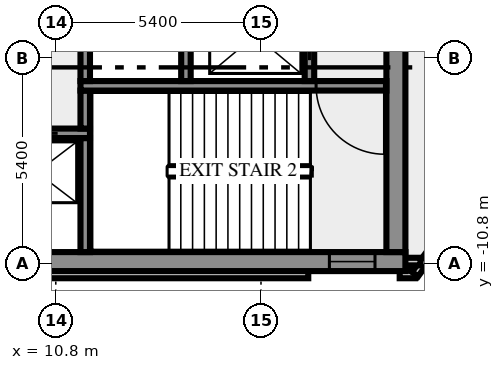
"""IFC4 building model, lengths in metres.
Left out: names, types, materials, properties, quantities, classifications, styles, units other than length and angle.
Written with IfcOpenShell. Run it as: python <this file> out.ifc"""

import sys

from ifc_helpers import new_model, si_unit, direction, frame, frame_2d, origin, place, context, subcontext, project, spatial, rectangle, extrude, element, fill, save


model = new_model("IFC4")
c1 = context("Model", 3, precision=1e-05, world=origin(), true_north=direction((0.0, 1.0)))
c2 = subcontext(c1, "Body", "Model", "MODEL_VIEW")
j1 = project(units=[si_unit("LENGTHUNIT", "METRE"), si_unit("PLANEANGLEUNIT", "RADIAN")], contexts=[c1])
p1 = place(None, origin())
s1 = spatial("IfcSite", under=j1, at=p1, CompositionType="ELEMENT")
p2 = place(p1, origin())
s2 = spatial("IfcBuilding", under=s1, at=p2, CompositionType="ELEMENT")
p3 = place(p2, frame((0.0, 0.0, 148.0)))
s3 = spatial("IfcBuildingStorey", under=s2, at=p3, CompositionType="ELEMENT", Elevation=148.0)
p4 = place(p3, frame((-17.444, -11.088, 0.0), z_axis=(0.0, 0.0, 1.0), x_axis=(1.0, 0.0, 0.0)))
e1 = element("IfcWall", 1, at=p4, inside=s3, PredefinedType="SOLIDWALL", context=c2, shape_type="SweptSolid", body=[
    extrude(rectangle(XDim=34.888, YDim=0.2, at=frame_2d((17.444, 0.0))), origin(), (0.0, 0.0, 1.0), 3.65),
])
p5 = place(p3, frame((19.85, -11.088, 0.0), z_axis=(0.0, 0.0, 1.0), x_axis=(1.0, 0.0, 0.0)))
e2 = element("IfcWall", 2, at=p5, inside=s3, PredefinedType="SOLIDWALL", context=c2, shape_type="SweptSolid", body=[
    extrude(rectangle(XDim=0.406, YDim=0.2, at=frame_2d((0.203, 0.0))), origin(), (0.0, 0.0, 1.0), 3.65),
])
p6 = place(p3, frame((20.253, -11.083, 0.0), z_axis=(0.0, 0.0, 1.0), x_axis=(0.587766567315, 0.809030569476, 0.0)))
e3 = element("IfcWall", 3, at=p6, inside=s3, PredefinedType="SOLIDWALL", context=c2, shape_type="SweptSolid", body=[
    extrude(rectangle(XDim=2.688, YDim=0.2, at=frame_2d((1.344, 0.0))), origin(), (0.0, 0.0, 1.0), 3.65),
])
p7 = place(p3, frame((19.98, -10.75, 0.0), z_axis=(0.0, 0.0, 1.0), x_axis=(1.0, 0.0, 0.0)))
e4 = element("IfcWall", 4, at=p7, inside=s3, PredefinedType="SOLIDWALL", context=c2, shape_type="SweptSolid", body=[
    extrude(rectangle(XDim=0.417, YDim=0.2, at=frame_2d((0.208, 0.0))), origin(), (0.0, 0.0, 1.0), 3.65),
])
p8 = place(p3, frame((-20.0, -10.75, 0.0), z_axis=(0.0, 0.0, 1.0), x_axis=(1.0, 0.0, 0.0)))
e5 = element("IfcWall", 5, at=p8, inside=s3, PredefinedType="SHEAR", context=c2, shape_type="SweptSolid", body=[
    extrude(rectangle(XDim=40.0, YDim=0.5, at=frame_2d((20.0, 0.0))), origin(), (0.0, 0.0, 1.0), 3.65),
])
p9 = place(p8, frame((0.8, 0.0, 1.0)))
e6 = element("IfcOpeningElement", 6, at=p9, cuts=e5, PredefinedType="OPENING", context=c2, shape_type="SweptSolid", body=[
    extrude(rectangle(XDim=1.2, YDim=1.2, at=frame_2d((0.6, 0.6))), frame((0.0, 0.26, 0.0), z_axis=(0.0, -1.0, 0.0), x_axis=(1.0, 0.0, 0.0)), (0.0, 0.0, 1.0), 0.52),
])
p10 = place(p8, frame((38.0, 0.0, 1.0)))
e7 = element("IfcOpeningElement", 7, at=p10, cuts=e5, PredefinedType="OPENING", context=c2, shape_type="SweptSolid", body=[
    extrude(rectangle(XDim=1.2, YDim=1.2, at=frame_2d((0.6, 0.6))), frame((0.0, 0.26, 0.0), z_axis=(0.0, -1.0, 0.0), x_axis=(1.0, 0.0, 0.0)), (0.0, 0.0, 1.0), 0.52),
])
p11 = place(p3, frame((11.575, -10.5, 0.0), z_axis=(0.0, 0.0, 1.0), x_axis=(0.0, 1.0, 0.0)))
e8 = element("IfcWall", 8, at=p11, inside=s3, PredefinedType="SHEAR", context=c2, shape_type="SweptSolid", body=[
    extrude(rectangle(XDim=3.0, YDim=0.25, at=frame_2d((1.5, 0.0))), origin(), (0.0, 0.0, 1.0), 3.65),
])
p12 = place(p3, frame((19.75, -10.5, 0.0), z_axis=(0.0, 0.0, 1.0), x_axis=(0.0, 1.0, 0.0)))
e9 = element("IfcWall", 9, at=p12, inside=s3, PredefinedType="SHEAR", context=c2, shape_type="SweptSolid", body=[
    extrude(rectangle(XDim=8.8, YDim=0.5, at=frame_2d((4.4, 0.0))), origin(), (0.0, 0.0, 1.0), 3.65),
])
p13 = place(p3, frame((11.7, -7.375, 0.0), z_axis=(0.0, 0.0, 1.0), x_axis=(-1.0, 0.0, 0.0)))
e10 = element("IfcWall", 10, at=p13, inside=s3, PredefinedType="SHEAR", context=c2, shape_type="SweptSolid", body=[
    extrude(rectangle(XDim=23.4, YDim=0.25, at=frame_2d((11.7, 0.0))), origin(), (0.0, 0.0, 1.0), 3.65),
])
p14 = place(p13, frame((21.812, 0.0, 0.0)))
e11 = element("IfcOpeningElement", 11, at=p14, cuts=e10, PredefinedType="OPENING", context=c2, shape_type="SweptSolid", body=[
    extrude(rectangle(XDim=0.9, YDim=2.1, at=frame_2d((0.45, 1.05))), frame((0.0, 0.135, 0.0), z_axis=(0.0, -1.0, 0.0), x_axis=(1.0, 0.0, 0.0)), (0.0, 0.0, 1.0), 0.27),
])
p15 = place(p13, frame((19.55, 0.0, 0.0)))
e12 = element("IfcOpeningElement", 12, at=p15, cuts=e10, PredefinedType="OPENING", context=c2, shape_type="SweptSolid", body=[
    extrude(rectangle(XDim=0.9, YDim=2.1, at=frame_2d((0.45, 1.05))), frame((0.0, 0.135, 0.0), z_axis=(0.0, -1.0, 0.0), x_axis=(1.0, 0.0, 0.0)), (0.0, 0.0, 1.0), 0.27),
])
p16 = place(p13, frame((16.787, 0.0, 0.0)))
e13 = element("IfcOpeningElement", 13, at=p16, cuts=e10, PredefinedType="OPENING", context=c2, shape_type="SweptSolid", body=[
    extrude(rectangle(XDim=0.9, YDim=2.1, at=frame_2d((0.45, 1.05))), frame((0.0, 0.135, 0.0), z_axis=(0.0, -1.0, 0.0), x_axis=(1.0, 0.0, 0.0)), (0.0, 0.0, 1.0), 0.27),
])
p17 = place(p13, frame((14.55, 0.0, 0.0)))
e14 = element("IfcOpeningElement", 14, at=p17, cuts=e10, PredefinedType="OPENING", context=c2, shape_type="SweptSolid", body=[
    extrude(rectangle(XDim=0.8, YDim=2.1, at=frame_2d((0.4, 1.05))), frame((0.0, 0.135, 0.0), z_axis=(0.0, -1.0, 0.0), x_axis=(1.0, 0.0, 0.0)), (0.0, 0.0, 1.0), 0.27),
])
p18 = place(p13, frame((12.8, 0.0, 0.0)))
e15 = element("IfcOpeningElement", 15, at=p18, cuts=e10, PredefinedType="OPENING", context=c2, shape_type="SweptSolid", body=[
    extrude(rectangle(XDim=0.9, YDim=2.1, at=frame_2d((0.45, 1.05))), frame((0.0, 0.135, 0.0), z_axis=(0.0, -1.0, 0.0), x_axis=(1.0, 0.0, 0.0)), (0.0, 0.0, 1.0), 0.27),
])
p19 = place(p13, frame((10.7, 0.0, 0.0)))
e16 = element("IfcOpeningElement", 16, at=p19, cuts=e10, PredefinedType="OPENING", context=c2, shape_type="SweptSolid", body=[
    extrude(rectangle(XDim=0.9, YDim=2.1, at=frame_2d((0.45, 1.05))), frame((0.0, 0.135, 0.0), z_axis=(0.0, -1.0, 0.0), x_axis=(1.0, 0.0, 0.0)), (0.0, 0.0, 1.0), 0.27),
])
p20 = place(p13, frame((8.35, 0.0, 0.0)))
e17 = element("IfcOpeningElement", 17, at=p20, cuts=e10, PredefinedType="OPENING", context=c2, shape_type="SweptSolid", body=[
    extrude(rectangle(XDim=1.1, YDim=2.1, at=frame_2d((0.55, 1.05))), frame((0.0, 0.135, 0.0), z_axis=(0.0, -1.0, 0.0), x_axis=(1.0, 0.0, 0.0)), (0.0, 0.0, 1.0), 0.27),
])
p21 = place(p13, frame((5.85, 0.0, 0.0)))
e18 = element("IfcOpeningElement", 18, at=p21, cuts=e10, PredefinedType="OPENING", context=c2, shape_type="SweptSolid", body=[
    extrude(rectangle(XDim=1.1, YDim=2.1, at=frame_2d((0.55, 1.05))), frame((0.0, 0.135, 0.0), z_axis=(0.0, -1.0, 0.0), x_axis=(1.0, 0.0, 0.0)), (0.0, 0.0, 1.0), 0.27),
])
p22 = place(p13, frame((3.35, 0.0, 0.0)))
e19 = element("IfcOpeningElement", 19, at=p22, cuts=e10, PredefinedType="OPENING", context=c2, shape_type="SweptSolid", body=[
    extrude(rectangle(XDim=1.1, YDim=2.1, at=frame_2d((0.55, 1.05))), frame((0.0, 0.135, 0.0), z_axis=(0.0, -1.0, 0.0), x_axis=(1.0, 0.0, 0.0)), (0.0, 0.0, 1.0), 0.27),
])
p23 = place(p13, frame((0.85, 0.0, 0.0)))
e20 = element("IfcOpeningElement", 20, at=p23, cuts=e10, PredefinedType="OPENING", context=c2, shape_type="SweptSolid", body=[
    extrude(rectangle(XDim=1.1, YDim=2.1, at=frame_2d((0.55, 1.05))), frame((0.0, 0.135, 0.0), z_axis=(0.0, -1.0, 0.0), x_axis=(1.0, 0.0, 0.0)), (0.0, 0.0, 1.0), 0.27),
])
p24 = place(p3, frame((11.575, -7.25, 0.0), z_axis=(0.0, 0.0, 1.0), x_axis=(0.0, 1.0, 0.0)))
e21 = element("IfcWall", 21, at=p24, inside=s3, PredefinedType="SHEAR", context=c2, shape_type="SweptSolid", body=[
    extrude(rectangle(XDim=1.0, YDim=0.25, at=frame_2d((0.5, 0.0))), origin(), (0.0, 0.0, 1.0), 3.65),
])
p25 = place(p3, frame((19.5, -6.125, 0.0), z_axis=(0.0, 0.0, 1.0), x_axis=(-1.0, 0.0, 0.0)))
e22 = element("IfcWall", 22, at=p25, inside=s3, PredefinedType="SHEAR", context=c2, shape_type="SweptSolid", body=[
    extrude(rectangle(XDim=8.05, YDim=0.25, at=frame_2d((4.025, 0.0))), origin(), (0.0, 0.0, 1.0), 3.65),
])
p26 = place(p25, frame((0.05, 0.0, 0.0)))
e23 = element("IfcOpeningElement", 23, at=p26, cuts=e22, PredefinedType="OPENING", context=c2, shape_type="SweptSolid", body=[
    extrude(rectangle(XDim=1.8, YDim=2.1, at=frame_2d((0.9, 1.05))), frame((0.0, 0.135, 0.0), z_axis=(0.0, -1.0, 0.0), x_axis=(1.0, 0.0, 0.0)), (0.0, 0.0, 1.0), 0.27),
])
p27 = place(p3, frame((11.575, -6.0, 0.0), z_axis=(0.0, 0.0, 1.0), x_axis=(0.0, 1.0, 0.0)))
e24 = element("IfcWall", 24, at=p27, inside=s3, PredefinedType="SHEAR", context=c2, shape_type="SweptSolid", body=[
    extrude(rectangle(XDim=1.75, YDim=0.25, at=frame_2d((0.875, 0.0))), origin(), (0.0, 0.0, 1.0), 3.65),
])
p28 = place(p3, frame((14.225, -6.0, 0.0), z_axis=(0.0, 0.0, 1.0), x_axis=(0.0, 1.0, 0.0)))
e25 = element("IfcWall", 25, at=p28, inside=s3, PredefinedType="SHEAR", context=c2, shape_type="SweptSolid", body=[
    extrude(rectangle(XDim=4.3, YDim=0.25, at=frame_2d((2.15, 0.0))), origin(), (0.0, 0.0, 1.0), 3.65),
])
p29 = place(p3, frame((17.475, -6.0, 0.0), z_axis=(0.0, 0.0, 1.0), x_axis=(0.0, 1.0, 0.0)))
e26 = element("IfcWall", 26, at=p29, inside=s3, PredefinedType="SHEAR", context=c2, shape_type="SweptSolid", body=[
    extrude(rectangle(XDim=4.3, YDim=0.25, at=frame_2d((2.15, 0.0))), origin(), (0.0, 0.0, 1.0), 3.65),
])
p30 = place(p29, frame((0.55, 0.0, 0.0)))
e27 = element("IfcOpeningElement", 27, at=p30, cuts=e26, PredefinedType="OPENING", context=c2, shape_type="SweptSolid", body=[
    extrude(rectangle(XDim=1.3, YDim=2.1, at=frame_2d((0.65, 1.05))), frame((0.0, 0.135, 0.0), z_axis=(0.0, -1.0, 0.0), x_axis=(1.0, 0.0, 0.0)), (0.0, 0.0, 1.0), 0.27),
])
p31 = place(p10, origin())
e28 = element("IfcWindow", 28, at=p31, inside=s3, PartitioningType="SINGLE_PANEL", PredefinedType="WINDOW", context=c2, shape_type="SweptSolid", body=[
    extrude(rectangle(XDim=1.2, YDim=1.2, at=frame_2d((0.6, 0.6))), frame((0.0, 0.03, 0.0), z_axis=(0.0, -1.0, 0.0), x_axis=(1.0, 0.0, 0.0)), (0.0, 0.0, 1.0), 0.06),
])
fill(e7, e28)
p32 = place(p23, origin())
e29 = element("IfcDoor", 29, at=p32, inside=s3, OperationType="DOUBLE_DOOR_SLIDING", PredefinedType="DOOR", context=c2, shape_type="SweptSolid", body=[
    extrude(rectangle(XDim=1.1, YDim=2.1, at=frame_2d((0.55, 1.05))), frame((0.0, 0.025, 0.0), z_axis=(0.0, -1.0, 0.0), x_axis=(1.0, 0.0, 0.0)), (0.0, 0.0, 1.0), 0.05),
])
fill(e20, e29)
p33 = place(p26, origin())
e30 = element("IfcDoor", 30, at=p33, inside=s3, OperationType="DOUBLE_DOOR_SINGLE_SWING", PredefinedType="DOOR", context=c2, shape_type="SweptSolid", body=[
    extrude(rectangle(XDim=1.8, YDim=2.1, at=frame_2d((0.9, 1.05))), frame((0.0, 0.025, 0.0), z_axis=(0.0, -1.0, 0.0), x_axis=(1.0, 0.0, 0.0)), (0.0, 0.0, 1.0), 0.05),
])
fill(e23, e30)
p34 = place(p30, origin())
e31 = element("IfcDoor", 31, at=p34, inside=s3, OperationType="DOUBLE_DOOR_SLIDING", PredefinedType="DOOR", context=c2, shape_type="SweptSolid", body=[
    extrude(rectangle(XDim=1.3, YDim=2.1, at=frame_2d((0.65, 1.05))), frame((0.0, 0.025, 0.0), z_axis=(0.0, -1.0, 0.0), x_axis=(1.0, 0.0, 0.0)), (0.0, 0.0, 1.0), 0.05),
])
fill(e27, e31)
save(model, sys.argv[1])
